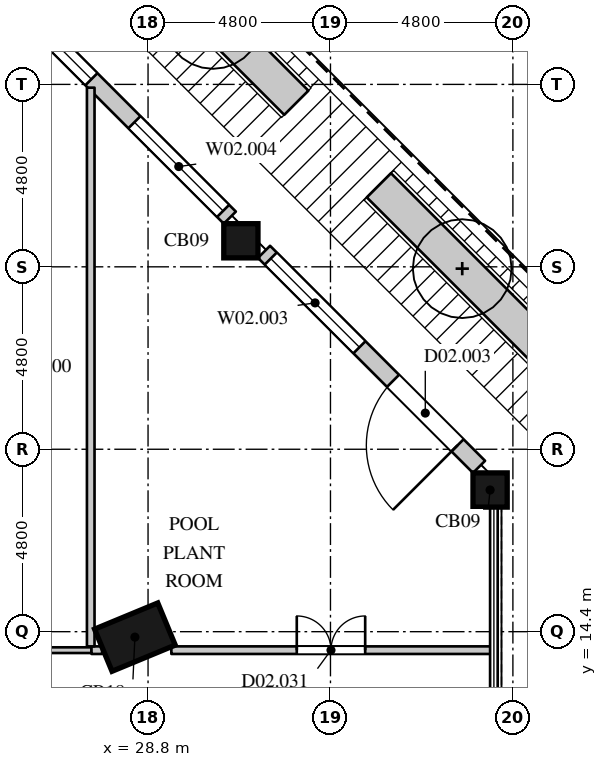
"""IFC4 building model, lengths in metres.
Left out: names, types, materials, properties, quantities, classifications, styles, units other than length and angle.
Written with IfcOpenShell. Run it as: python <this file> out.ifc"""

import sys

from ifc_helpers import new_model, si_unit, direction, frame, frame_2d, origin, origin_2d, place, context, subcontext, project, spatial, rectangle, extrude, element, fill, save


model = new_model("IFC4")
c1 = context("Model", 3, precision=1e-05, world=origin(), true_north=direction((0.0, 1.0)))
c2 = subcontext(c1, "Body", "Model", "MODEL_VIEW")
j1 = project(units=[si_unit("LENGTHUNIT", "METRE"), si_unit("PLANEANGLEUNIT", "RADIAN")], contexts=[c1])
p1 = place(None, origin())
s1 = spatial("IfcSite", under=j1, at=p1, CompositionType="ELEMENT")
p2 = place(p1, origin())
s2 = spatial("IfcBuilding", under=s1, at=p2, CompositionType="ELEMENT")
p3 = place(p2, frame((0.0, 0.0, 11.0)))
s3 = spatial("IfcBuildingStorey", under=s2, at=p3, CompositionType="ELEMENT", Elevation=11.0)
p4 = place(p3, frame((28.454, 14.257, 0.0), z_axis=(0.0, 0.0, 1.0), x_axis=(-0.382683496864, 0.923879505795, 0.0)))
e1 = element("IfcColumn", 1, at=p4, inside=s3, PredefinedType="COLUMN", context=c2, shape_type="SweptSolid", body=[
    extrude(rectangle(XDim=1.2, YDim=1.8, at=origin_2d()), origin(), (0.0, 0.0, 1.0), 5.0),
])
for number, where, z_axis, x_axis in (
    (2, (37.8, 18.128, 0.0), (0.0, 0.0, 1.0), (1.0, 0.0, 0.0)),
    (3, (31.243, 24.685, 0.0), (0.0, 0.0, 1.0), (1.0, 0.0, 0.0)),
):
    element("IfcColumn", number, at=place(p3, frame(where, z_axis=z_axis, x_axis=x_axis)), inside=s3, PredefinedType="COLUMN", context=c2, shape_type="SweptSolid", body=[
        extrude(rectangle(XDim=0.9, YDim=0.9, at=origin_2d()), origin(), (0.0, 0.0, 1.0), 5.0),
    ])
p5 = place(p3, frame((37.509, 18.737, 0.0), z_axis=(0.0, 0.0, 1.0), x_axis=(-0.707106781187, 0.707106781187, 0.0)))
e4 = element("IfcWall", 4, at=p5, inside=s3, PredefinedType="ELEMENTEDWALL", context=c2, shape_type="SweptSolid", body=[
    extrude(rectangle(XDim=8.0, YDim=0.45, at=frame_2d((4.0, 0.0))), origin(), (0.0, 0.0, 1.0), 3.8),
])
p6 = place(p5, frame((0.8, 0.0, 0.0)))
e5 = element("IfcOpeningElement", 5, at=p6, cuts=e4, PredefinedType="OPENING", context=c2, shape_type="SweptSolid", body=[
    extrude(rectangle(XDim=2.4, YDim=2.7, at=frame_2d((1.2, 1.35))), frame((0.0, 0.235, 0.0), z_axis=(0.0, -1.0, 0.0), x_axis=(1.0, 0.0, 0.0)), (0.0, 0.0, 1.0), 0.47),
])
p7 = place(p5, frame((4.45, 0.0, 1.05)))
e6 = element("IfcOpeningElement", 6, at=p7, cuts=e4, PredefinedType="OPENING", context=c2, shape_type="SweptSolid", body=[
    extrude(rectangle(XDim=3.3, YDim=2.7, at=frame_2d((1.65, 1.35))), frame((0.0, 0.235, 0.0), z_axis=(0.0, -1.0, 0.0), x_axis=(1.0, 0.0, 0.0)), (0.0, 0.0, 1.0), 0.47),
])
p8 = place(p3, frame((30.952, 25.294, 0.0), z_axis=(0.0, 0.0, 1.0), x_axis=(-0.707106781187, 0.707106781187, 0.0)))
e7 = element("IfcWall", 7, at=p8, inside=s3, PredefinedType="ELEMENTEDWALL", context=c2, shape_type="SweptSolid", body=[
    extrude(rectangle(XDim=8.0, YDim=0.45, at=frame_2d((4.0, 0.0))), origin(), (0.0, 0.0, 1.0), 3.8),
])
p9 = place(p8, frame((0.25, 0.0, 1.05)))
e8 = element("IfcOpeningElement", 8, at=p9, cuts=e7, PredefinedType="OPENING", context=c2, shape_type="SweptSolid", body=[
    extrude(rectangle(XDim=3.3, YDim=2.7, at=frame_2d((1.65, 1.35))), frame((0.0, 0.235, 0.0), z_axis=(0.0, -1.0, 0.0), x_axis=(1.0, 0.0, 0.0)), (0.0, 0.0, 1.0), 0.47),
])
p10 = place(p8, frame((5.151, 0.0, 1.05)))
e9 = element("IfcOpeningElement", 9, at=p10, cuts=e7, PredefinedType="OPENING", context=c2, shape_type="SweptSolid", body=[
    extrude(rectangle(XDim=2.6, YDim=2.7, at=frame_2d((1.3, 1.35))), frame((0.0, 0.235, 0.0), z_axis=(0.0, -1.0, 0.0), x_axis=(1.0, 0.0, 0.0)), (0.0, 0.0, 1.0), 0.47),
])
p11 = place(p3, frame((39.259, 21.76, 0.0), z_axis=(0.0, 0.0, 1.0), x_axis=(-0.707126467061, 0.707087094764, 0.0)))
e10 = element("IfcWall", 10, at=p11, inside=s3, PredefinedType="USERDEFINED", context=c2, shape_type="SweptSolid", body=[
    extrude(rectangle(XDim=6.201, YDim=0.9, at=frame_2d((3.101, 0.0))), origin(), (0.0, 0.0, 1.0), 0.9),
])
p12 = place(p3, frame((32.702, 28.317, 0.0), z_axis=(0.0, 0.0, 1.0), x_axis=(-0.707106781187, 0.707106781187, 0.0)))
e11 = element("IfcWall", 11, at=p12, inside=s3, PredefinedType="USERDEFINED", context=c2, shape_type="SweptSolid", body=[
    extrude(rectangle(XDim=6.201, YDim=0.9, at=frame_2d((3.1, 0.0))), origin(), (0.0, 0.0, 1.0), 0.9),
])
p13 = place(p3, frame((17.428, 13.914, 0.0), z_axis=(0.0, 0.0, 1.0), x_axis=(1.0, 0.0, 0.0)))
e12 = element("IfcWall", 12, at=p13, inside=s3, PredefinedType="PARTITIONING", context=c2, shape_type="SweptSolid", body=[
    extrude(rectangle(XDim=9.884, YDim=0.15, at=frame_2d((4.942, 0.0))), origin(), (0.0, 0.0, 1.0), 4.65),
])
p14 = place(p13, frame((4.1, 0.0, 0.0)))
e13 = element("IfcOpeningElement", 13, at=p14, cuts=e12, PredefinedType="OPENING", context=c2, shape_type="SweptSolid", body=[
    extrude(rectangle(XDim=1.6, YDim=2.4, at=frame_2d((0.8, 1.2))), frame((0.0, 0.085, 0.0), z_axis=(0.0, -1.0, 0.0), x_axis=(1.0, 0.0, 0.0)), (0.0, 0.0, 1.0), 0.17),
])
p15 = place(p3, frame((27.312, 13.914, 0.0), z_axis=(0.0, 0.0, 1.0), x_axis=(1.0, 0.0, 0.0)))
e14 = element("IfcWall", 14, at=p15, inside=s3, PredefinedType="PARTITIONING", context=c2, shape_type="SweptSolid", body=[
    extrude(rectangle(XDim=0.281, YDim=0.2, at=frame_2d((0.14, 0.0))), origin(), (0.0, 0.0, 1.0), 4.65),
])
p16 = place(p3, frame((29.413, 13.914, 0.0), z_axis=(0.0, 0.0, 1.0), x_axis=(1.0, 0.0, 0.0)))
e15 = element("IfcWall", 15, at=p16, inside=s3, PredefinedType="PARTITIONING", context=c2, shape_type="SweptSolid", body=[
    extrude(rectangle(XDim=8.442, YDim=0.2, at=frame_2d((4.221, 0.0))), origin(), (0.0, 0.0, 1.0), 4.65),
])
p17 = place(p16, frame((3.3, 0.0, 0.0)))
e16 = element("IfcOpeningElement", 16, at=p17, cuts=e15, PredefinedType="OPENING", context=c2, shape_type="SweptSolid", body=[
    extrude(rectangle(XDim=1.8, YDim=2.4, at=frame_2d((0.9, 1.2))), frame((0.0, 0.11, 0.0), z_axis=(0.0, -1.0, 0.0), x_axis=(1.0, 0.0, 0.0)), (0.0, 0.0, 1.0), 0.22),
])
p18 = place(p3, frame((27.292, 14.013, 0.0), z_axis=(0.0, 0.0, 1.0), x_axis=(0.0, 1.0, 0.0)))
e17 = element("IfcWall", 17, at=p18, inside=s3, PredefinedType="PARTITIONING", context=c2, shape_type="SweptSolid", body=[
    extrude(rectangle(XDim=14.7, YDim=0.2, at=frame_2d((7.35, 0.0))), origin(), (0.0, 0.0, 1.0), 4.65),
])
p19 = place(p6, origin())
e18 = element("IfcDoor", 18, at=p19, inside=s3, OperationType="SINGLE_SWING_LEFT", PredefinedType="DOOR", context=c2, shape_type="SweptSolid", body=[
    extrude(rectangle(XDim=2.4, YDim=2.7, at=frame_2d((1.2, 1.35))), frame((0.0, 0.13, 0.0), z_axis=(0.0, -1.0, 0.0), x_axis=(1.0, 0.0, 0.0)), (0.0, 0.0, 1.0), 0.05),
])
fill(e5, e18)
p20 = place(p7, origin())
e19 = element("IfcWindow", 19, at=p20, inside=s3, PartitioningType="SINGLE_PANEL", PredefinedType="WINDOW", context=c2, shape_type="SweptSolid", body=[
    extrude(rectangle(XDim=3.3, YDim=2.7, at=frame_2d((1.65, 1.35))), frame((0.0, 0.135, 0.0), z_axis=(0.0, -1.0, 0.0), x_axis=(1.0, 0.0, 0.0)), (0.0, 0.0, 1.0), 0.06),
])
fill(e6, e19)
p21 = place(p9, origin())
e20 = element("IfcWindow", 20, at=p21, inside=s3, PartitioningType="SINGLE_PANEL", PredefinedType="WINDOW", context=c2, shape_type="SweptSolid", body=[
    extrude(rectangle(XDim=3.3, YDim=2.7, at=frame_2d((1.65, 1.35))), frame((0.0, 0.135, 0.0), z_axis=(0.0, -1.0, 0.0), x_axis=(1.0, 0.0, 0.0)), (0.0, 0.0, 1.0), 0.06),
])
fill(e8, e20)
p22 = place(p10, origin())
e21 = element("IfcWindow", 21, at=p22, inside=s3, PartitioningType="SINGLE_PANEL", PredefinedType="WINDOW", context=c2, shape_type="SweptSolid", body=[
    extrude(rectangle(XDim=2.6, YDim=2.7, at=frame_2d((1.3, 1.35))), frame((0.0, 0.135, 0.0), z_axis=(0.0, -1.0, 0.0), x_axis=(1.0, 0.0, 0.0)), (0.0, 0.0, 1.0), 0.06),
])
fill(e9, e21)
p23 = place(p17, origin())
e22 = element("IfcDoor", 22, at=p23, inside=s3, OperationType="DOUBLE_DOOR_SINGLE_SWING", PredefinedType="DOOR", context=c2, shape_type="SweptSolid", body=[
    extrude(rectangle(XDim=1.8, YDim=2.4, at=frame_2d((0.9, 1.2))), frame((0.0, 0.025, 0.0), z_axis=(0.0, -1.0, 0.0), x_axis=(1.0, 0.0, 0.0)), (0.0, 0.0, 1.0), 0.05),
])
fill(e16, e22)
save(model, sys.argv[1])
